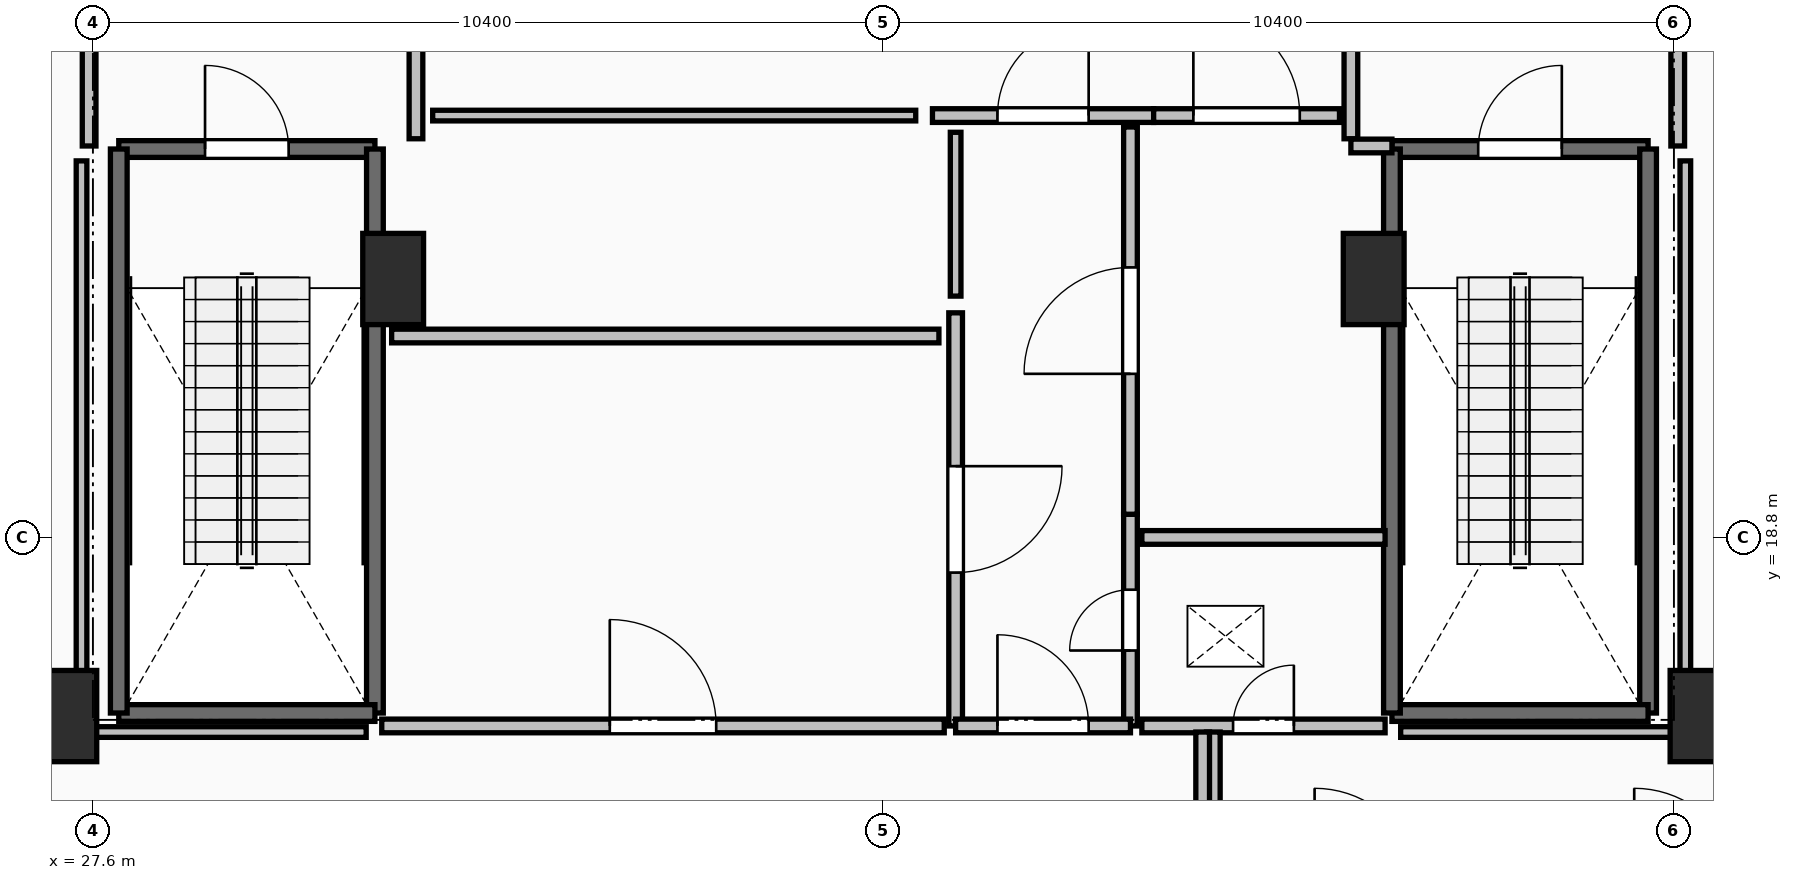
"""IFC4 building model, lengths in metres.
Left out: names, types, materials, properties, quantities, classifications, styles, units other than length and angle.
Written with IfcOpenShell. Run it as: python <this file> out.ifc"""

import sys

from ifc_helpers import new_model, si_unit, direction, frame, frame_2d, origin, origin_2d, place, context, subcontext, project, spatial, rectangle, extrude, element, fill, save


model = new_model("IFC4")
c1 = context("Model", 3, precision=1e-05, world=origin(), true_north=direction((0.0, 1.0)))
c2 = subcontext(c1, "Body", "Model", "MODEL_VIEW")
j1 = project(units=[si_unit("LENGTHUNIT", "METRE"), si_unit("PLANEANGLEUNIT", "RADIAN")], contexts=[c1])
p1 = place(None, origin())
s1 = spatial("IfcSite", under=j1, at=p1, CompositionType="ELEMENT")
p2 = place(p1, origin())
s2 = spatial("IfcBuilding", under=s1, at=p2, CompositionType="ELEMENT")
p3 = place(p2, frame((0.0, 0.0, -4.8)))
s3 = spatial("IfcBuildingStorey", under=s2, at=p3, CompositionType="ELEMENT", Elevation=-4.8)
for number, where, z_axis, x_axis in (
    (1, (27.25, 16.45, 0.0), (0.0, 0.0, 1.0), (1.0, 0.0, 0.0)),
    (2, (31.55, 22.2, 0.0), (0.0, 0.0, 1.0), (1.0, 0.0, 0.0)),
    (3, (48.75, 16.45, 0.0), (0.0, 0.0, 1.0), (1.0, 0.0, 0.0)),
    (4, (44.45, 22.2, 0.0), (0.0, 0.0, 1.0), (1.0, 0.0, 0.0)),
):
    element("IfcColumn", number, at=place(p3, frame(where, z_axis=z_axis, x_axis=x_axis)), inside=s3, PredefinedType="PILASTER", context=c2, shape_type="SweptSolid", body=[
        extrude(rectangle(XDim=0.8, YDim=1.2, at=origin_2d()), origin(), (0.0, 0.0, 1.0), 4.8),
    ])
p4 = place(p3, frame((27.94, 23.91, 0.0), z_axis=(0.0, 0.0, 1.0), x_axis=(1.0, 0.0, 0.0)))
e5 = element("IfcWall", 5, at=p4, inside=s3, PredefinedType="SOLIDWALL", context=c2, shape_type="SweptSolid", body=[
    extrude(rectangle(XDim=3.37, YDim=0.22, at=frame_2d((1.685, 0.0))), origin(), (0.0, 0.0, 1.0), 4.46),
])
p5 = place(p4, frame((1.135, 0.0, 0.0)))
e6 = element("IfcOpeningElement", 6, at=p5, cuts=e5, PredefinedType="OPENING", context=c2, shape_type="SweptSolid", body=[
    extrude(rectangle(XDim=1.1, YDim=2.15, at=frame_2d((0.55, 1.075))), frame((0.0, 0.125, 0.0), z_axis=(0.0, -1.0, 0.0), x_axis=(1.0, 0.0, 0.0)), (0.0, 0.0, 1.0), 0.25),
])
p6 = place(p3, frame((31.31, 23.91, 0.0), z_axis=(0.0, 0.0, 1.0), x_axis=(0.0, -1.0, 0.0)))
e7 = element("IfcWall", 7, at=p6, inside=s3, PredefinedType="SOLIDWALL", context=c2, shape_type="SweptSolid", body=[
    extrude(rectangle(XDim=7.42, YDim=0.22, at=frame_2d((3.71, 0.0))), origin(), (0.0, 0.0, 1.0), 4.46),
])
p7 = place(p3, frame((31.31, 16.49, 0.0), z_axis=(0.0, 0.0, 1.0), x_axis=(-1.0, 0.0, 0.0)))
e8 = element("IfcWall", 8, at=p7, inside=s3, PredefinedType="SOLIDWALL", context=c2, shape_type="SweptSolid", body=[
    extrude(rectangle(XDim=3.37, YDim=0.22, at=frame_2d((1.685, 0.0))), origin(), (0.0, 0.0, 1.0), 4.46),
])
p8 = place(p3, frame((27.94, 16.49, 0.0), z_axis=(0.0, 0.0, 1.0), x_axis=(0.0, 1.0, 0.0)))
e9 = element("IfcWall", 9, at=p8, inside=s3, PredefinedType="SOLIDWALL", context=c2, shape_type="SweptSolid", body=[
    extrude(rectangle(XDim=7.42, YDim=0.22, at=frame_2d((3.71, 0.0))), origin(), (0.0, 0.0, 1.0), 4.46),
])
p9 = place(p3, frame((44.69, 23.91, 0.0), z_axis=(0.0, 0.0, 1.0), x_axis=(1.0, 0.0, 0.0)))
e10 = element("IfcWall", 10, at=p9, inside=s3, PredefinedType="SOLIDWALL", context=c2, shape_type="SweptSolid", body=[
    extrude(rectangle(XDim=3.37, YDim=0.22, at=frame_2d((1.685, 0.0))), origin(), (0.0, 0.0, 1.0), 4.46),
])
p10 = place(p9, frame((1.135, 0.0, 0.0)))
e11 = element("IfcOpeningElement", 11, at=p10, cuts=e10, PredefinedType="OPENING", context=c2, shape_type="SweptSolid", body=[
    extrude(rectangle(XDim=1.1, YDim=2.15, at=frame_2d((0.55, 1.075))), frame((0.0, 0.125, 0.0), z_axis=(0.0, -1.0, 0.0), x_axis=(1.0, 0.0, 0.0)), (0.0, 0.0, 1.0), 0.25),
])
p11 = place(p3, frame((48.06, 23.91, 0.0), z_axis=(0.0, 0.0, 1.0), x_axis=(0.0, -1.0, 0.0)))
e12 = element("IfcWall", 12, at=p11, inside=s3, PredefinedType="SOLIDWALL", context=c2, shape_type="SweptSolid", body=[
    extrude(rectangle(XDim=7.42, YDim=0.22, at=frame_2d((3.71, 0.0))), origin(), (0.0, 0.0, 1.0), 4.46),
])
p12 = place(p3, frame((48.06, 16.49, 0.0), z_axis=(0.0, 0.0, 1.0), x_axis=(-1.0, 0.0, 0.0)))
e13 = element("IfcWall", 13, at=p12, inside=s3, PredefinedType="SOLIDWALL", context=c2, shape_type="SweptSolid", body=[
    extrude(rectangle(XDim=3.37, YDim=0.22, at=frame_2d((1.685, 0.0))), origin(), (0.0, 0.0, 1.0), 4.46),
])
p13 = place(p3, frame((44.69, 16.49, 0.0), z_axis=(0.0, 0.0, 1.0), x_axis=(0.0, 1.0, 0.0)))
e14 = element("IfcWall", 14, at=p13, inside=s3, PredefinedType="SOLIDWALL", context=c2, shape_type="SweptSolid", body=[
    extrude(rectangle(XDim=7.42, YDim=0.22, at=frame_2d((3.71, 0.0))), origin(), (0.0, 0.0, 1.0), 4.46),
])
p14 = place(p3, frame((31.85, 24.045, 0.0), z_axis=(0.0, 0.0, 1.0), x_axis=(0.0, 1.0, 0.0)))
e15 = element("IfcWall", 15, at=p14, inside=s3, PredefinedType="PARTITIONING", context=c2, shape_type="SweptSolid", body=[
    extrude(rectangle(XDim=3.91, YDim=0.18, at=frame_2d((1.955, 0.0))), origin(), (0.0, 0.0, 1.0), 4.46),
])
p15 = place(p14, frame((1.355, 0.0, 0.0)))
e16 = element("IfcOpeningElement", 16, at=p15, cuts=e15, PredefinedType="OPENING", context=c2, shape_type="SweptSolid", body=[
    extrude(rectangle(XDim=1.2, YDim=2.15, at=frame_2d((0.6, 1.075))), frame((0.0, 0.105, 0.0), z_axis=(0.0, -1.0, 0.0), x_axis=(1.0, 0.0, 0.0)), (0.0, 0.0, 1.0), 0.21),
])
p16 = place(p3, frame((27.55, 28.0, 0.0), z_axis=(0.0, 0.0, 1.0), x_axis=(0.0, -1.0, 0.0)))
e17 = element("IfcWall", 17, at=p16, inside=s3, PredefinedType="PARTITIONING", context=c2, shape_type="SweptSolid", body=[
    extrude(rectangle(XDim=4.05, YDim=0.18, at=frame_2d((2.025, 0.0))), origin(), (0.0, 0.0, 1.0), 3.04),
])
p17 = place(p16, frame((1.425, 0.0, 0.0)))
e18 = element("IfcOpeningElement", 18, at=p17, cuts=e17, PredefinedType="OPENING", context=c2, shape_type="SweptSolid", body=[
    extrude(rectangle(XDim=1.2, YDim=2.15, at=frame_2d((0.6, 1.075))), frame((0.0, 0.105, 0.0), z_axis=(0.0, -1.0, 0.0), x_axis=(1.0, 0.0, 0.0)), (0.0, 0.0, 1.0), 0.21),
])
p18 = place(p3, frame((44.15, 27.955, 0.0), z_axis=(0.0, 0.0, 1.0), x_axis=(0.0, -1.0, 0.0)))
e19 = element("IfcWall", 19, at=p18, inside=s3, PredefinedType="PARTITIONING", context=c2, shape_type="SweptSolid", body=[
    extrude(rectangle(XDim=3.91, YDim=0.18, at=frame_2d((1.955, 0.0))), origin(), (0.0, 0.0, 1.0), 4.46),
])
p19 = place(p18, frame((1.355, 0.0, 0.0)))
e20 = element("IfcOpeningElement", 20, at=p19, cuts=e19, PredefinedType="OPENING", context=c2, shape_type="SweptSolid", body=[
    extrude(rectangle(XDim=1.2, YDim=2.15, at=frame_2d((0.6, 1.075))), frame((0.0, 0.105, 0.0), z_axis=(0.0, -1.0, 0.0), x_axis=(1.0, 0.0, 0.0)), (0.0, 0.0, 1.0), 0.21),
])
p20 = place(p3, frame((44.15, 23.95, 0.0), z_axis=(0.0, 0.0, 1.0), x_axis=(1.0, 0.0, 0.0)))
e21 = element("IfcWall", 21, at=p20, inside=s3, PredefinedType="PARTITIONING", context=c2, shape_type="SweptSolid", body=[
    extrude(rectangle(XDim=0.54, YDim=0.18, at=frame_2d((0.27, 0.0))), origin(), (0.0, 0.0, 1.0), 4.46),
])
p21 = place(p3, frame((48.45, 23.95, 0.0), z_axis=(0.0, 0.0, 1.0), x_axis=(0.0, 1.0, 0.0)))
e22 = element("IfcWall", 22, at=p21, inside=s3, PredefinedType="PARTITIONING", context=c2, shape_type="SweptSolid", body=[
    extrude(rectangle(XDim=4.05, YDim=0.18, at=frame_2d((2.025, 0.0))), origin(), (0.0, 0.0, 1.0), 3.04),
])
p22 = place(p21, frame((1.425, 0.0, 0.0)))
e23 = element("IfcOpeningElement", 23, at=p22, cuts=e22, PredefinedType="OPENING", context=c2, shape_type="SweptSolid", body=[
    extrude(rectangle(XDim=1.2, YDim=2.15, at=frame_2d((0.6, 1.075))), frame((0.0, 0.105, 0.0), z_axis=(0.0, -1.0, 0.0), x_axis=(1.0, 0.0, 0.0)), (0.0, 0.0, 1.0), 0.21),
])
p23 = place(p3, frame((38.645, 24.35, 0.0), z_axis=(0.0, 0.0, 1.0), x_axis=(1.0, 0.0, 0.0)))
e24 = element("IfcWall", 24, at=p23, inside=s3, PredefinedType="PARTITIONING", context=c2, shape_type="SweptSolid", body=[
    extrude(rectangle(XDim=2.91, YDim=0.18, at=frame_2d((1.455, 0.0))), origin(), (0.0, 0.0, 1.0), 4.46),
])
p24 = place(p23, frame((0.855, 0.0, 0.0)))
e25 = element("IfcOpeningElement", 25, at=p24, cuts=e24, PredefinedType="OPENING", context=c2, shape_type="SweptSolid", body=[
    extrude(rectangle(XDim=1.2, YDim=2.15, at=frame_2d((0.6, 1.075))), frame((0.0, 0.105, 0.0), z_axis=(0.0, -1.0, 0.0), x_axis=(1.0, 0.0, 0.0)), (0.0, 0.0, 1.0), 0.21),
])
p25 = place(p3, frame((41.555, 24.35, 0.0), z_axis=(0.0, 0.0, 1.0), x_axis=(1.0, 0.0, 0.0)))
e26 = element("IfcWall", 26, at=p25, inside=s3, PredefinedType="PARTITIONING", context=c2, shape_type="SweptSolid", body=[
    extrude(rectangle(XDim=2.445, YDim=0.18, at=frame_2d((1.223, 0.0))), origin(), (0.0, 0.0, 1.0), 4.46),
])
p26 = place(p25, frame((0.522, 0.0, 0.0)))
e27 = element("IfcOpeningElement", 27, at=p26, cuts=e26, PredefinedType="OPENING", context=c2, shape_type="SweptSolid", body=[
    extrude(rectangle(XDim=1.4, YDim=2.2, at=frame_2d((0.7, 1.1))), frame((0.0, 0.105, 0.0), z_axis=(0.0, -1.0, 0.0), x_axis=(1.0, 0.0, 0.0)), (0.0, 0.0, 1.0), 0.21),
])
p27 = place(p3, frame((38.95, 21.755, 0.0), z_axis=(0.0, 0.0, 1.0), x_axis=(0.0, -1.0, 0.0)))
e28 = element("IfcWall", 28, at=p27, inside=s3, PredefinedType="PARTITIONING", context=c2, shape_type="SweptSolid", body=[
    extrude(rectangle(XDim=5.435, YDim=0.18, at=frame_2d((2.717, 0.0))), origin(), (0.0, 0.0, 1.0), 4.46),
])
p28 = place(p27, frame((2.018, 0.0, 0.0)))
e29 = element("IfcOpeningElement", 29, at=p28, cuts=e28, PredefinedType="OPENING", context=c2, shape_type="SweptSolid", body=[
    extrude(rectangle(XDim=1.4, YDim=2.2, at=frame_2d((0.7, 1.1))), frame((0.0, 0.105, 0.0), z_axis=(0.0, -1.0, 0.0), x_axis=(1.0, 0.0, 0.0)), (0.0, 0.0, 1.0), 0.21),
])
p29 = place(p3, frame((41.25, 16.32, 0.0), z_axis=(0.0, 0.0, 1.0), x_axis=(0.0, 1.0, 0.0)))
e30 = element("IfcWall", 30, at=p29, inside=s3, PredefinedType="PARTITIONING", context=c2, shape_type="SweptSolid", body=[
    extrude(rectangle(XDim=2.785, YDim=0.18, at=frame_2d((1.393, 0.0))), origin(), (0.0, 0.0, 1.0), 4.46),
])
p30 = place(p29, frame((0.992, 0.0, 0.0)))
e31 = element("IfcOpeningElement", 31, at=p30, cuts=e30, PredefinedType="OPENING", context=c2, shape_type="SweptSolid", body=[
    extrude(rectangle(XDim=0.8, YDim=2.05, at=frame_2d((0.4, 1.025))), frame((0.0, 0.105, 0.0), z_axis=(0.0, -1.0, 0.0), x_axis=(1.0, 0.0, 0.0)), (0.0, 0.0, 1.0), 0.21),
])
p31 = place(p3, frame((41.25, 19.105, 0.0), z_axis=(0.0, 0.0, 1.0), x_axis=(0.0, 1.0, 0.0)))
e32 = element("IfcWall", 32, at=p31, inside=s3, PredefinedType="PARTITIONING", context=c2, shape_type="SweptSolid", body=[
    extrude(rectangle(XDim=5.095, YDim=0.18, at=frame_2d((2.547, 0.0))), origin(), (0.0, 0.0, 1.0), 4.46),
])
p32 = place(p31, frame((1.847, 0.0, 0.0)))
e33 = element("IfcOpeningElement", 33, at=p32, cuts=e32, PredefinedType="OPENING", context=c2, shape_type="SweptSolid", body=[
    extrude(rectangle(XDim=1.4, YDim=2.2, at=frame_2d((0.7, 1.1))), frame((0.0, 0.105, 0.0), z_axis=(0.0, -1.0, 0.0), x_axis=(1.0, 0.0, 0.0)), (0.0, 0.0, 1.0), 0.21),
])
p33 = place(p3, frame((38.95, 16.32, 0.0), z_axis=(0.0, 0.0, 1.0), x_axis=(1.0, 0.0, 0.0)))
e34 = element("IfcWall", 34, at=p33, inside=s3, PredefinedType="PARTITIONING", context=c2, shape_type="SweptSolid", body=[
    extrude(rectangle(XDim=2.3, YDim=0.18, at=frame_2d((1.15, 0.0))), origin(), (0.0, 0.0, 1.0), 4.46),
])
p34 = place(p33, frame((0.55, 0.0, 0.0)))
e35 = element("IfcOpeningElement", 35, at=p34, cuts=e34, PredefinedType="OPENING", context=c2, shape_type="SweptSolid", body=[
    extrude(rectangle(XDim=1.2, YDim=2.15, at=frame_2d((0.6, 1.075))), frame((0.0, 0.105, 0.0), z_axis=(0.0, -1.0, 0.0), x_axis=(1.0, 0.0, 0.0)), (0.0, 0.0, 1.0), 0.21),
])
p35 = place(p3, frame((31.4, 16.32, 0.0), z_axis=(0.0, 0.0, 1.0), x_axis=(1.0, 0.0, 0.0)))
e36 = element("IfcWall", 36, at=p35, inside=s3, PredefinedType="PARTITIONING", context=c2, shape_type="SweptSolid", body=[
    extrude(rectangle(XDim=7.4, YDim=0.18, at=frame_2d((3.7, 0.0))), origin(), (0.0, 0.0, 1.0), 4.46),
])
p36 = place(p35, frame((3.0, 0.0, 0.0)))
e37 = element("IfcOpeningElement", 37, at=p36, cuts=e36, PredefinedType="OPENING", context=c2, shape_type="SweptSolid", body=[
    extrude(rectangle(XDim=1.4, YDim=2.2, at=frame_2d((0.7, 1.1))), frame((0.0, 0.105, 0.0), z_axis=(0.0, -1.0, 0.0), x_axis=(1.0, 0.0, 0.0)), (0.0, 0.0, 1.0), 0.21),
])
p37 = place(p3, frame((44.6, 18.8, 0.0), z_axis=(0.0, 0.0, 1.0), x_axis=(-1.0, 0.0, 0.0)))
e38 = element("IfcWall", 38, at=p37, inside=s3, PredefinedType="PARTITIONING", context=c2, shape_type="SweptSolid", body=[
    extrude(rectangle(XDim=3.2, YDim=0.18, at=frame_2d((1.6, 0.0))), origin(), (0.0, 0.0, 1.0), 4.46),
])
p38 = place(p3, frame((41.4, 16.32, 0.0), z_axis=(0.0, 0.0, 1.0), x_axis=(1.0, 0.0, 0.0)))
e39 = element("IfcWall", 39, at=p38, inside=s3, PredefinedType="PARTITIONING", context=c2, shape_type="SweptSolid", body=[
    extrude(rectangle(XDim=3.2, YDim=0.18, at=frame_2d((1.6, 0.0))), origin(), (0.0, 0.0, 1.0), 4.46),
])
p39 = place(p38, frame((1.2, 0.0, 0.0)))
e40 = element("IfcOpeningElement", 40, at=p39, cuts=e39, PredefinedType="OPENING", context=c2, shape_type="SweptSolid", body=[
    extrude(rectangle(XDim=0.8, YDim=2.05, at=frame_2d((0.4, 1.025))), frame((0.0, 0.105, 0.0), z_axis=(0.0, -1.0, 0.0), x_axis=(1.0, 0.0, 0.0)), (0.0, 0.0, 1.0), 0.21),
])
for number, where, z_axis, x_axis in (
    (41, (42.34, 16.24, 0.0), (0.0, 0.0, 1.0), (0.0, -1.0, 0.0)),
    (42, (42.2, 14.1, 0.0), (0.0, 0.0, 1.0), (0.0, 1.0, 0.0)),
):
    element("IfcWall", number, at=place(p3, frame(where, z_axis=z_axis, x_axis=x_axis)), inside=s3, PredefinedType="PARTITIONING", context=c2, shape_type="SweptSolid", body=[
        extrude(rectangle(XDim=2.14, YDim=0.18, at=frame_2d((1.07, 0.0))), origin(), (0.0, 0.0, 1.0), 4.46),
    ])
p40 = place(p3, frame((32.07, 24.35, 0.0), z_axis=(0.0, 0.0, 1.0), x_axis=(1.0, 0.0, 0.0)))
e43 = element("IfcWall", 43, at=p40, inside=s3, PredefinedType="PARTITIONING", context=c2, shape_type="SweptSolid", body=[
    extrude(rectangle(XDim=6.355, YDim=0.14, at=frame_2d((3.177, 0.0))), origin(), (0.0, 0.0, 1.0), 4.46),
])
p41 = place(p3, frame((38.95, 24.13, 0.0), z_axis=(0.0, 0.0, 1.0), x_axis=(0.0, -1.0, 0.0)))
e44 = element("IfcWall", 44, at=p41, inside=s3, PredefinedType="PARTITIONING", context=c2, shape_type="SweptSolid", body=[
    extrude(rectangle(XDim=2.155, YDim=0.14, at=frame_2d((1.077, 0.0))), origin(), (0.0, 0.0, 1.0), 4.46),
])
p42 = place(p3, frame((38.73, 21.45, 0.0), z_axis=(0.0, 0.0, 1.0), x_axis=(-1.0, 0.0, 0.0)))
e45 = element("IfcWall", 45, at=p42, inside=s3, PredefinedType="PARTITIONING", context=c2, shape_type="SweptSolid", body=[
    extrude(rectangle(XDim=7.2, YDim=0.18, at=frame_2d((3.6, 0.0))), origin(), (0.0, 0.0, 1.0), 4.46),
])
p43 = place(p3, frame((48.55, 23.754, 0.0), z_axis=(0.0, 0.0, 1.0), x_axis=(0.0, -1.0, 0.0)))
e46 = element("IfcWall", 46, at=p43, inside=s3, PredefinedType="PARTITIONING", context=c2, shape_type="SweptSolid", body=[
    extrude(rectangle(XDim=7.514, YDim=0.14, at=frame_2d((3.757, 0.0))), origin(), (0.0, 0.0, 1.0), 3.04),
])
for number, where, z_axis, x_axis in (
    (47, (48.55, 16.24, 0.0), (0.0, 0.0, 1.0), (-1.0, 0.0, 0.0)),
    (48, (31.195, 16.24, 0.0), (0.0, 0.0, 1.0), (-1.0, 0.0, 0.0)),
):
    element("IfcWall", number, at=place(p3, frame(where, z_axis=z_axis, x_axis=x_axis)), inside=s3, PredefinedType="PARTITIONING", context=c2, shape_type="SweptSolid", body=[
        extrude(rectangle(XDim=3.745, YDim=0.14, at=frame_2d((1.873, 0.0))), origin(), (0.0, 0.0, 1.0), 3.652),
    ])
p44 = place(p3, frame((27.45, 16.24, 0.0), z_axis=(0.0, 0.0, 1.0), x_axis=(0.0, 1.0, 0.0)))
e49 = element("IfcWall", 49, at=p44, inside=s3, PredefinedType="PARTITIONING", context=c2, shape_type="SweptSolid", body=[
    extrude(rectangle(XDim=7.514, YDim=0.14, at=frame_2d((3.757, 0.0))), origin(), (0.0, 0.0, 1.0), 3.04),
])
p45 = place(p5, origin())
e50 = element("IfcDoor", 50, at=p45, inside=s3, OperationType="SINGLE_SWING_LEFT", PredefinedType="DOOR", context=c2, shape_type="SweptSolid", body=[
    extrude(rectangle(XDim=1.1, YDim=2.15, at=frame_2d((0.55, 1.075))), frame((0.0, 0.025, 0.0), z_axis=(0.0, -1.0, 0.0), x_axis=(1.0, 0.0, 0.0)), (0.0, 0.0, 1.0), 0.05),
])
fill(e6, e50)
p46 = place(p10, origin())
e51 = element("IfcDoor", 51, at=p46, inside=s3, OperationType="SINGLE_SWING_RIGHT", PredefinedType="DOOR", context=c2, shape_type="SweptSolid", body=[
    extrude(rectangle(XDim=1.1, YDim=2.15, at=frame_2d((0.55, 1.075))), frame((0.0, 0.025, 0.0), z_axis=(0.0, -1.0, 0.0), x_axis=(1.0, 0.0, 0.0)), (0.0, 0.0, 1.0), 0.05),
])
fill(e11, e51)
p47 = place(p24, origin())
e52 = element("IfcDoor", 52, at=p47, inside=s3, OperationType="SINGLE_SWING_RIGHT", PredefinedType="DOOR", context=c2, shape_type="SweptSolid", body=[
    extrude(rectangle(XDim=1.2, YDim=2.15, at=frame_2d((0.6, 1.075))), frame((0.0, 0.025, 0.0), z_axis=(0.0, -1.0, 0.0), x_axis=(1.0, 0.0, 0.0)), (0.0, 0.0, 1.0), 0.05),
])
fill(e25, e52)
p48 = place(p26, origin())
e53 = element("IfcDoor", 53, at=p48, inside=s3, OperationType="DOUBLE_SWING_LEFT", PredefinedType="DOOR", context=c2, shape_type="SweptSolid", body=[
    extrude(rectangle(XDim=1.4, YDim=2.2, at=frame_2d((0.7, 1.1))), frame((0.0, 0.025, 0.0), z_axis=(0.0, -1.0, 0.0), x_axis=(1.0, 0.0, 0.0)), (0.0, 0.0, 1.0), 0.05),
])
fill(e27, e53)
p49 = place(p28, origin())
e54 = element("IfcDoor", 54, at=p49, inside=s3, OperationType="DOUBLE_SWING_LEFT", PredefinedType="DOOR", context=c2, shape_type="SweptSolid", body=[
    extrude(rectangle(XDim=1.4, YDim=2.2, at=frame_2d((0.7, 1.1))), frame((0.0, 0.025, 0.0), z_axis=(0.0, -1.0, 0.0), x_axis=(1.0, 0.0, 0.0)), (0.0, 0.0, 1.0), 0.05),
])
fill(e29, e54)
p50 = place(p30, origin())
e55 = element("IfcDoor", 55, at=p50, inside=s3, OperationType="SINGLE_SWING_LEFT", PredefinedType="DOOR", context=c2, shape_type="SweptSolid", body=[
    extrude(rectangle(XDim=0.8, YDim=2.05, at=frame_2d((0.4, 1.025))), frame((0.0, 0.025, 0.0), z_axis=(0.0, -1.0, 0.0), x_axis=(1.0, 0.0, 0.0)), (0.0, 0.0, 1.0), 0.05),
])
fill(e31, e55)
p51 = place(p32, origin())
e56 = element("IfcDoor", 56, at=p51, inside=s3, OperationType="DOUBLE_SWING_LEFT", PredefinedType="DOOR", context=c2, shape_type="SweptSolid", body=[
    extrude(rectangle(XDim=1.4, YDim=2.2, at=frame_2d((0.7, 1.1))), frame((0.0, 0.025, 0.0), z_axis=(0.0, -1.0, 0.0), x_axis=(1.0, 0.0, 0.0)), (0.0, 0.0, 1.0), 0.05),
])
fill(e33, e56)
p52 = place(p34, origin())
e57 = element("IfcDoor", 57, at=p52, inside=s3, OperationType="SINGLE_SWING_LEFT", PredefinedType="DOOR", context=c2, shape_type="SweptSolid", body=[
    extrude(rectangle(XDim=1.2, YDim=2.15, at=frame_2d((0.6, 1.075))), frame((0.0, 0.025, 0.0), z_axis=(0.0, -1.0, 0.0), x_axis=(1.0, 0.0, 0.0)), (0.0, 0.0, 1.0), 0.05),
])
fill(e35, e57)
p53 = place(p36, origin())
e58 = element("IfcDoor", 58, at=p53, inside=s3, OperationType="DOUBLE_SWING_LEFT", PredefinedType="DOOR", context=c2, shape_type="SweptSolid", body=[
    extrude(rectangle(XDim=1.4, YDim=2.2, at=frame_2d((0.7, 1.1))), frame((0.0, 0.025, 0.0), z_axis=(0.0, -1.0, 0.0), x_axis=(1.0, 0.0, 0.0)), (0.0, 0.0, 1.0), 0.05),
])
fill(e37, e58)
p54 = place(p39, origin())
e59 = element("IfcDoor", 59, at=p54, inside=s3, OperationType="SINGLE_SWING_RIGHT", PredefinedType="DOOR", context=c2, shape_type="SweptSolid", body=[
    extrude(rectangle(XDim=0.8, YDim=2.05, at=frame_2d((0.4, 1.025))), frame((0.0, 0.025, 0.0), z_axis=(0.0, -1.0, 0.0), x_axis=(1.0, 0.0, 0.0)), (0.0, 0.0, 1.0), 0.05),
])
fill(e40, e59)
save(model, sys.argv[1])
